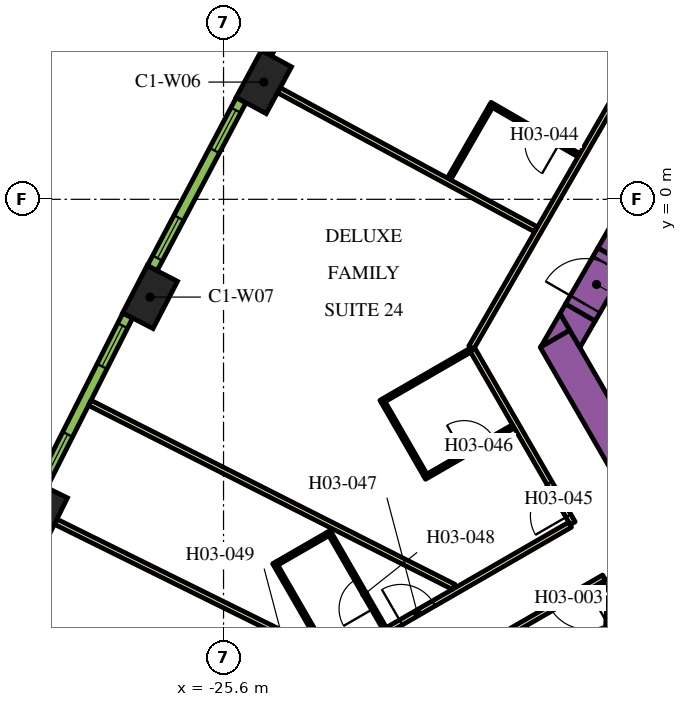
"""IFC4 building model, lengths in metres.
Left out: names, types, materials, properties, quantities, classifications, styles, units other than length and angle.
Written with IfcOpenShell. Run it as: python <this file> out.ifc"""

import sys

from ifc_helpers import new_model, si_unit, direction, frame, frame_2d, origin, origin_2d, place, context, subcontext, project, spatial, polyline, rectangle, outline, extrude, element, fill, save


model = new_model("IFC4")
c1 = context("Model", 3, precision=1e-05, world=origin(), true_north=direction((0.0, 1.0)))
c2 = subcontext(c1, "Body", "Model", "MODEL_VIEW")
j1 = project(units=[si_unit("LENGTHUNIT", "METRE"), si_unit("PLANEANGLEUNIT", "RADIAN")], contexts=[c1])
p1 = place(None, origin())
s1 = spatial("IfcSite", under=j1, at=p1, CompositionType="ELEMENT")
p2 = place(p1, origin())
s2 = spatial("IfcBuilding", under=s1, at=p2, CompositionType="ELEMENT")
p3 = place(p2, frame((0.0, 0.0, 51.0)))
s3 = spatial("IfcBuildingStorey", under=s2, at=p3, CompositionType="ELEMENT", Elevation=51.0)
for number, where, z_axis, x_axis in (
    (1, (-24.54, 3.085, 0.0), (0.0, 0.0, 1.0), (-0.476, -0.88, 0.0)),
    (2, (-27.533, -2.572, 0.0), (0.0, 0.0, 1.0), (-0.459, -0.888, 0.0)),
    (3, (-30.421, -8.284, 0.0), (0.0, 0.0, 1.0), (-0.443, -0.897, 0.0)),
):
    element("IfcColumn", number, at=place(p3, frame(where, z_axis=z_axis, x_axis=x_axis)), inside=s3, PredefinedType="COLUMN", context=c2, shape_type="SweptSolid", body=[
        extrude(rectangle(XDim=1.4, YDim=0.9, at=origin_2d()), origin(), (0.0, 0.0, 1.0), 3.9),
    ])
p4 = place(p3, frame((-15.36, -1.503, 0.0), z_axis=(0.0, 0.0, 1.0), x_axis=(0.50000389221, 0.866023156604, 0.0)))
e4 = element("IfcWall", 4, at=p4, inside=s3, PredefinedType="SOLIDWALL", context=c2, shape_type="SweptSolid", body=[
    extrude(rectangle(XDim=21.0, YDim=0.9, at=frame_2d((10.5, 0.0))), origin(), (0.0, 0.0, 1.0), 3.9),
])
p5 = place(p3, frame((-12.134, -11.883, 0.0), z_axis=(0.0, 0.0, 1.0), x_axis=(-0.500005339912, 0.866022320763, 0.0)))
e5 = element("IfcWall", 5, at=p5, inside=s3, PredefinedType="SOLIDWALL", context=c2, shape_type="SweptSolid", body=[
    extrude(rectangle(XDim=9.488, YDim=0.9, at=frame_2d((4.744, 0.0))), origin(), (0.0, 0.0, 1.0), 3.9),
])
p6 = place(p3, origin())
e6 = element("IfcWall", 6, at=p6, inside=s3, PredefinedType="SOLIDWALL", context=c2, shape_type="SweptSolid", body=[
    extrude(outline(polyline([(-16.489, -3.44), (-17.251, -3.88), (-16.743, -3.0), (-16.489, -3.44)])), origin(), (0.0, 0.0, 1.0), 3.9),
])
e7 = element("IfcWall", 7, at=p6, inside=s3, PredefinedType="SOLIDWALL", context=c2, shape_type="SweptSolid", body=[
    extrude(outline(polyline([(-15.82, -3.201), (-16.223, -3.9), (-16.743, -3.0), (-16.599, -2.751), (-15.82, -3.201)])), origin(), (0.0, 0.0, 1.0), 3.9),
])
p7 = place(p3, frame((-16.209, -2.976, 0.0), z_axis=(0.0, 0.0, 1.0), x_axis=(0.499954529098, 0.86605165483, 0.0)))
e8 = element("IfcWall", 8, at=p7, inside=s3, PredefinedType="SOLIDWALL", context=c2, shape_type="SweptSolid", body=[
    extrude(rectangle(XDim=1.7, YDim=0.9, at=frame_2d((0.85, 0.0))), origin(), (0.0, 0.0, 1.0), 3.9),
])
p8 = place(p7, frame((0.25, 0.0, 0.0)))
e9 = element("IfcOpeningElement", 9, at=p8, cuts=e8, PredefinedType="OPENING", context=c2, shape_type="SweptSolid", body=[
    extrude(rectangle(XDim=1.2, YDim=2.1, at=frame_2d((0.6, 1.05))), frame((0.0, 0.46, 0.0), z_axis=(0.0, -1.0, 0.0), x_axis=(1.0, 0.0, 0.0)), (0.0, 0.0, 1.0), 0.92),
])
p9 = place(p3, frame((-19.081, -3.9, 0.0), z_axis=(0.0, 0.0, 1.0), x_axis=(0.499998313975, 0.866026377209, 0.0)))
e10 = element("IfcWall", 10, at=p9, inside=s3, PredefinedType="PARTITIONING", context=c2, shape_type="SweptSolid", body=[
    extrude(rectangle(XDim=25.766, YDim=0.15, at=frame_2d((12.883, 0.0))), origin(), (0.0, 0.0, 1.0), 2.75),
])
p10 = place(p9, frame((22.445, 0.0, 0.0)))
e11 = element("IfcOpeningElement", 11, at=p10, cuts=e10, PredefinedType="OPENING", context=c2, shape_type="SweptSolid", body=[
    extrude(rectangle(XDim=1.0, YDim=2.1, at=frame_2d((0.5, 1.05))), frame((0.0, 0.085, 0.0), z_axis=(0.0, -1.0, 0.0), x_axis=(1.0, 0.0, 0.0)), (0.0, 0.0, 1.0), 0.17),
])
p11 = place(p9, frame((21.138, 0.0, 0.0)))
e12 = element("IfcOpeningElement", 12, at=p11, cuts=e10, PredefinedType="OPENING", context=c2, shape_type="SweptSolid", body=[
    extrude(rectangle(XDim=1.0, YDim=2.1, at=frame_2d((0.5, 1.05))), frame((0.0, 0.085, 0.0), z_axis=(0.0, -1.0, 0.0), x_axis=(1.0, 0.0, 0.0)), (0.0, 0.0, 1.0), 0.17),
])
p12 = place(p9, frame((14.066, 0.0, 0.0)))
e13 = element("IfcOpeningElement", 13, at=p12, cuts=e10, PredefinedType="OPENING", context=c2, shape_type="SweptSolid", body=[
    extrude(rectangle(XDim=0.9, YDim=2.1, at=frame_2d((0.45, 1.05))), frame((0.0, 0.085, 0.0), z_axis=(0.0, -1.0, 0.0), x_axis=(1.0, 0.0, 0.0)), (0.0, 0.0, 1.0), 0.17),
])
p13 = place(p9, frame((11.693, 0.0, 0.0)))
e14 = element("IfcOpeningElement", 14, at=p13, cuts=e10, PredefinedType="OPENING", context=c2, shape_type="SweptSolid", body=[
    extrude(rectangle(XDim=1.0, YDim=2.1, at=frame_2d((0.5, 1.05))), frame((0.0, 0.085, 0.0), z_axis=(0.0, -1.0, 0.0), x_axis=(1.0, 0.0, 0.0)), (0.0, 0.0, 1.0), 0.17),
])
p14 = place(p3, frame((-16.412, -8.523, 0.0), z_axis=(0.0, 0.0, 1.0), x_axis=(-0.500001929737, 0.866024289647, 0.0)))
e15 = element("IfcWall", 15, at=p14, inside=s3, PredefinedType="PARTITIONING", context=c2, shape_type="SweptSolid", body=[
    extrude(rectangle(XDim=5.268, YDim=0.15, at=frame_2d((2.634, 0.0))), origin(), (0.0, 0.0, 1.0), 2.75),
])
p15 = place(p14, frame((0.226, 0.0, 0.0)))
e16 = element("IfcOpeningElement", 16, at=p15, cuts=e15, PredefinedType="OPENING", context=c2, shape_type="SweptSolid", body=[
    extrude(rectangle(XDim=1.0, YDim=2.1, at=frame_2d((0.5, 1.05))), frame((0.0, 0.085, 0.0), z_axis=(0.0, -1.0, 0.0), x_axis=(1.0, 0.0, 0.0)), (0.0, 0.0, 1.0), 0.17),
])
p16 = place(p3, frame((-30.463, -16.635, 0.0), z_axis=(0.0, 0.0, 1.0), x_axis=(0.866022394896, 0.500005211512, 0.0)))
e17 = element("IfcWall", 17, at=p16, inside=s3, PredefinedType="PARTITIONING", context=c2, shape_type="SweptSolid", body=[
    extrude(rectangle(XDim=16.144, YDim=0.15, at=frame_2d((8.072, 0.0))), origin(), (0.0, 0.0, 1.0), 2.75),
])
p17 = place(p16, frame((11.004, 0.0, 0.0)))
e18 = element("IfcOpeningElement", 18, at=p17, cuts=e17, PredefinedType="OPENING", context=c2, shape_type="SweptSolid", body=[
    extrude(rectangle(XDim=1.0, YDim=2.1, at=frame_2d((0.5, 1.05))), frame((0.0, 0.085, 0.0), z_axis=(0.0, -1.0, 0.0), x_axis=(1.0, 0.0, 0.0)), (0.0, 0.0, 1.0), 0.17),
])
p18 = place(p16, frame((7.274, 0.0, 0.0)))
e19 = element("IfcOpeningElement", 19, at=p18, cuts=e17, PredefinedType="OPENING", context=c2, shape_type="SweptSolid", body=[
    extrude(rectangle(XDim=1.0, YDim=2.1, at=frame_2d((0.5, 1.05))), frame((0.0, 0.085, 0.0), z_axis=(0.0, -1.0, 0.0), x_axis=(1.0, 0.0, 0.0)), (0.0, 0.0, 1.0), 0.17),
])
p19 = place(p3, frame((-15.587, -9.952, 0.0), z_axis=(0.0, 0.0, 1.0), x_axis=(-0.866022197818, -0.500005552856, 0.0)))
e20 = element("IfcWall", 20, at=p19, inside=s3, PredefinedType="PARTITIONING", context=c2, shape_type="SweptSolid", body=[
    extrude(rectangle(XDim=16.224, YDim=0.15, at=frame_2d((8.112, 0.0))), origin(), (0.0, 0.0, 1.0), 2.75),
])
p20 = place(p19, frame((7.949, 0.0, 0.0)))
e21 = element("IfcOpeningElement", 21, at=p20, cuts=e20, PredefinedType="OPENING", context=c2, shape_type="SweptSolid", body=[
    extrude(rectangle(XDim=1.0, YDim=2.1, at=frame_2d((0.5, 1.05))), frame((0.0, 0.085, 0.0), z_axis=(0.0, -1.0, 0.0), x_axis=(1.0, 0.0, 0.0)), (0.0, 0.0, 1.0), 0.17),
])
p21 = place(p19, frame((0.525, 0.0, 0.0)))
e22 = element("IfcOpeningElement", 22, at=p21, cuts=e20, PredefinedType="OPENING", context=c2, shape_type="SweptSolid", body=[
    extrude(rectangle(XDim=1.1, YDim=2.1, at=frame_2d((0.55, 1.05))), frame((0.0, 0.085, 0.0), z_axis=(0.0, -1.0, 0.0), x_axis=(1.0, 0.0, 0.0)), (0.0, 0.0, 1.0), 0.17),
])
p22 = place(p3, frame((-12.918, -14.575, 0.0), z_axis=(0.0, 0.0, 1.0), x_axis=(-0.500009150678, 0.866020120573, 0.0)))
e23 = element("IfcWall", 23, at=p22, inside=s3, PredefinedType="PARTITIONING", context=c2, shape_type="SweptSolid", body=[
    extrude(rectangle(XDim=5.258, YDim=0.15, at=frame_2d((2.629, 0.0))), origin(), (0.0, 0.0, 1.0), 2.75),
])
p23 = place(p3, frame((-30.018, -8.483, 0.0), z_axis=(0.0, 0.0, 1.0), x_axis=(0.896544505264, -0.44295366584, 0.0)))
e24 = element("IfcWall", 24, at=p23, inside=s3, PredefinedType="PARTITIONING", context=c2, shape_type="SweptSolid", body=[
    extrude(rectangle(XDim=8.079, YDim=0.15, at=frame_2d((4.04, 0.0))), origin(), (0.0, 0.0, 1.0), 2.75),
])
p24 = place(p3, frame((-29.12, -5.356, 0.0), z_axis=(0.0, 0.0, 1.0), x_axis=(0.892401965553, -0.451241323327, 0.0)))
e25 = element("IfcWall", 25, at=p24, inside=s3, PredefinedType="PARTITIONING", context=c2, shape_type="SweptSolid", body=[
    extrude(rectangle(XDim=10.729, YDim=0.15, at=frame_2d((5.364, 0.0))), origin(), (0.0, 0.0, 1.0), 2.75),
])
p25 = place(p3, frame((-24.145, 2.871, 0.0), z_axis=(0.0, 0.0, 1.0), x_axis=(0.879551725039, -0.475803281809, 0.0)))
e26 = element("IfcWall", 26, at=p25, inside=s3, PredefinedType="PARTITIONING", context=c2, shape_type="SweptSolid", body=[
    extrude(rectangle(XDim=7.688, YDim=0.15, at=frame_2d((3.844, 0.0))), origin(), (0.0, 0.0, 1.0), 2.75),
])
p26 = place(p3, frame((-15.973, -22.109, 0.0), z_axis=(0.0, 0.0, 1.0), x_axis=(0.046191717129, 0.998932592955, 0.0)))
e27 = element("IfcWall", 27, at=p26, inside=s3, PredefinedType="PARTITIONING", context=c2, shape_type="SweptSolid", body=[
    extrude(rectangle(XDim=11.638, YDim=0.15, at=frame_2d((5.819, 0.0))), origin(), (0.0, 0.0, 1.0), 2.75),
])
p27 = place(p3, frame((-16.247, 1.159, 0.0), z_axis=(0.0, 0.0, 1.0), x_axis=(-0.866059108428, 0.4999416173, 0.0)))
e28 = element("IfcWall", 28, at=p27, inside=s3, PredefinedType="PARTITIONING", context=c2, shape_type="SweptSolid", body=[
    extrude(rectangle(XDim=2.7, YDim=0.1, at=frame_2d((1.35, 0.0))), origin(), (0.0, 0.0, 1.0), 2.75),
])
p28 = place(p27, frame((0.6, 0.0, 0.0)))
e29 = element("IfcOpeningElement", 29, at=p28, cuts=e28, PredefinedType="OPENING", context=c2, shape_type="SweptSolid", body=[
    extrude(rectangle(XDim=0.9, YDim=2.1, at=frame_2d((0.45, 1.05))), frame((0.0, 0.06, 0.0), z_axis=(0.0, -1.0, 0.0), x_axis=(1.0, 0.0, 0.0)), (0.0, 0.0, 1.0), 0.12),
])
p29 = place(p3, frame((-18.567, 2.441, 0.0), z_axis=(0.0, 0.0, 1.0), x_axis=(-0.499946605688, -0.86605622881, 0.0)))
e30 = element("IfcWall", 30, at=p29, inside=s3, PredefinedType="PARTITIONING", context=c2, shape_type="SweptSolid", body=[
    extrude(rectangle(XDim=2.2, YDim=0.1, at=frame_2d((1.1, 0.0))), origin(), (0.0, 0.0, 1.0), 2.75),
])
p30 = place(p3, frame((-20.31, -7.323, 0.0), z_axis=(0.0, 0.0, 1.0), x_axis=(0.86599734893, 0.500048589285, 0.0)))
e31 = element("IfcWall", 31, at=p30, inside=s3, PredefinedType="PARTITIONING", context=c2, shape_type="SweptSolid", body=[
    extrude(rectangle(XDim=2.7, YDim=0.1, at=frame_2d((1.35, 0.0))), origin(), (0.0, 0.0, 1.0), 2.75),
])
p31 = place(p30, frame((1.2, 0.0, 0.0)))
e32 = element("IfcOpeningElement", 32, at=p31, cuts=e31, PredefinedType="OPENING", context=c2, shape_type="SweptSolid", body=[
    extrude(rectangle(XDim=0.9, YDim=2.1, at=frame_2d((0.45, 1.05))), frame((0.0, 0.06, 0.0), z_axis=(0.0, -1.0, 0.0), x_axis=(1.0, 0.0, 0.0)), (0.0, 0.0, 1.0), 0.12),
])
p32 = place(p3, frame((-20.291, -7.254, 0.0), z_axis=(0.0, 0.0, 1.0), x_axis=(-0.50002983664, 0.866008176907, 0.0)))
e33 = element("IfcWall", 33, at=p32, inside=s3, PredefinedType="PARTITIONING", context=c2, shape_type="SweptSolid", body=[
    extrude(rectangle(XDim=2.2, YDim=0.1, at=frame_2d((1.1, 0.0))), origin(), (0.0, 0.0, 1.0), 2.75),
])
p33 = place(p3, frame((-19.121, -3.981, 0.0), z_axis=(0.0, 0.0, 1.0), x_axis=(-0.866019956843, -0.50000943426, 0.0)))
e34 = element("IfcWall", 34, at=p33, inside=s3, PredefinedType="PARTITIONING", context=c2, shape_type="SweptSolid", body=[
    extrude(rectangle(XDim=2.7, YDim=0.1, at=frame_2d((1.35, 0.0))), origin(), (0.0, 0.0, 1.0), 2.75),
])
p34 = place(p3, frame((-21.36, -11.293, 0.0), z_axis=(0.0, 0.0, 1.0), x_axis=(-0.49997559174, 0.866039495442, 0.0)))
e35 = element("IfcWall", 35, at=p34, inside=s3, PredefinedType="PARTITIONING", context=c2, shape_type="SweptSolid", body=[
    extrude(rectangle(XDim=2.95, YDim=0.1, at=frame_2d((1.475, 0.0))), origin(), (0.0, 0.0, 1.0), 2.75),
])
p35 = place(p34, frame((0.6, 0.0, 0.0)))
e36 = element("IfcOpeningElement", 36, at=p35, cuts=e35, PredefinedType="OPENING", context=c2, shape_type="SweptSolid", body=[
    extrude(rectangle(XDim=0.9, YDim=2.1, at=frame_2d((0.45, 1.05))), frame((0.0, 0.06, 0.0), z_axis=(0.0, -1.0, 0.0), x_axis=(1.0, 0.0, 0.0)), (0.0, 0.0, 1.0), 0.12),
])
p36 = place(p3, frame((-22.853, -8.806, 0.0), z_axis=(0.0, 0.0, 1.0), x_axis=(-0.86601511528, -0.500017819788, 0.0)))
e37 = element("IfcWall", 37, at=p36, inside=s3, PredefinedType="PARTITIONING", context=c2, shape_type="SweptSolid", body=[
    extrude(rectangle(XDim=1.55, YDim=0.1, at=frame_2d((0.775, 0.0))), origin(), (0.0, 0.0, 1.0), 2.75),
])
p37 = place(p3, frame((-22.944, -11.85, 0.0), z_axis=(0.0, 0.0, 1.0), x_axis=(-0.499938597367, 0.866060851709, 0.0)))
e38 = element("IfcWall", 38, at=p37, inside=s3, PredefinedType="PARTITIONING", context=c2, shape_type="SweptSolid", body=[
    extrude(rectangle(XDim=2.64, YDim=0.1, at=frame_2d((1.32, 0.0))), origin(), (0.0, 0.0, 1.0), 2.75),
])
p38 = place(p3, frame((-22.05, 8.22, 0.0), z_axis=(0.0, 0.0, 1.0), x_axis=(-0.483912572871, -0.875116347589, 0.0)))
e39 = element("IfcWall", 39, at=p38, inside=s3, PredefinedType="SOLIDWALL", context=c2, shape_type="SweptSolid", body=[
    extrude(rectangle(XDim=4.998, YDim=0.29, at=frame_2d((2.499, 0.0))), origin(), (0.0, 0.0, 1.0), 3.65),
])
p39 = place(p38, frame((0.297, 0.0, 0.9)))
e40 = element("IfcOpeningElement", 40, at=p39, cuts=e39, PredefinedType="OPENING", context=c2, shape_type="SweptSolid", body=[
    extrude(rectangle(XDim=1.2, YDim=2.15, at=frame_2d((0.6, 1.075))), frame((0.0, 0.155, 0.0), z_axis=(0.0, -1.0, 0.0), x_axis=(1.0, 0.0, 0.0)), (0.0, 0.0, 1.0), 0.31),
])
p40 = place(p38, frame((3.501, 0.0, 0.9)))
e41 = element("IfcOpeningElement", 41, at=p40, cuts=e39, PredefinedType="OPENING", context=c2, shape_type="SweptSolid", body=[
    extrude(rectangle(XDim=1.2, YDim=2.15, at=frame_2d((0.6, 1.075))), frame((0.0, 0.155, 0.0), z_axis=(0.0, -1.0, 0.0), x_axis=(1.0, 0.0, 0.0)), (0.0, 0.0, 1.0), 0.31),
])
p41 = place(p3, frame((-25.138, 2.608, 0.0), z_axis=(0.0, 0.0, 1.0), x_axis=(-0.467629620899, -0.883924509026, 0.0)))
e42 = element("IfcWall", 42, at=p41, inside=s3, PredefinedType="SOLIDWALL", context=c2, shape_type="SweptSolid", body=[
    extrude(rectangle(XDim=4.998, YDim=0.29, at=frame_2d((2.499, 0.0))), origin(), (0.0, 0.0, 1.0), 3.65),
])
p42 = place(p41, frame((0.297, 0.0, 0.9)))
e43 = element("IfcOpeningElement", 43, at=p42, cuts=e42, PredefinedType="OPENING", context=c2, shape_type="SweptSolid", body=[
    extrude(rectangle(XDim=1.2, YDim=2.15, at=frame_2d((0.6, 1.075))), frame((0.0, 0.155, 0.0), z_axis=(0.0, -1.0, 0.0), x_axis=(1.0, 0.0, 0.0)), (0.0, 0.0, 1.0), 0.31),
])
p43 = place(p41, frame((3.501, 0.0, 0.9)))
e44 = element("IfcOpeningElement", 44, at=p43, cuts=e42, PredefinedType="OPENING", context=c2, shape_type="SweptSolid", body=[
    extrude(rectangle(XDim=1.2, YDim=2.15, at=frame_2d((0.6, 1.075))), frame((0.0, 0.155, 0.0), z_axis=(0.0, -1.0, 0.0), x_axis=(1.0, 0.0, 0.0)), (0.0, 0.0, 1.0), 0.31),
])
p44 = place(p3, frame((-28.122, -3.06, 0.0), z_axis=(0.0, 0.0, 1.0), x_axis=(-0.451233929645, -0.892405704115, 0.0)))
e45 = element("IfcWall", 45, at=p44, inside=s3, PredefinedType="SOLIDWALL", context=c2, shape_type="SweptSolid", body=[
    extrude(rectangle(XDim=4.998, YDim=0.29, at=frame_2d((2.499, 0.0))), origin(), (0.0, 0.0, 1.0), 3.65),
])
p45 = place(p44, frame((0.297, 0.0, 0.9)))
e46 = element("IfcOpeningElement", 46, at=p45, cuts=e45, PredefinedType="OPENING", context=c2, shape_type="SweptSolid", body=[
    extrude(rectangle(XDim=1.2, YDim=2.15, at=frame_2d((0.6, 1.075))), frame((0.0, 0.155, 0.0), z_axis=(0.0, -1.0, 0.0), x_axis=(1.0, 0.0, 0.0)), (0.0, 0.0, 1.0), 0.31),
])
p46 = place(p44, frame((3.501, 0.0, 0.9)))
e47 = element("IfcOpeningElement", 47, at=p46, cuts=e45, PredefinedType="OPENING", context=c2, shape_type="SweptSolid", body=[
    extrude(rectangle(XDim=1.2, YDim=2.15, at=frame_2d((0.6, 1.075))), frame((0.0, 0.155, 0.0), z_axis=(0.0, -1.0, 0.0), x_axis=(1.0, 0.0, 0.0)), (0.0, 0.0, 1.0), 0.31),
])
p47 = place(p8, origin())
e48 = element("IfcDoor", 48, at=p47, inside=s3, OperationType="SINGLE_SWING_LEFT", PredefinedType="DOOR", context=c2, shape_type="SweptSolid", body=[
    extrude(rectangle(XDim=1.2, YDim=2.1, at=frame_2d((0.6, 1.05))), frame((0.0, 0.025, 0.0), z_axis=(0.0, -1.0, 0.0), x_axis=(1.0, 0.0, 0.0)), (0.0, 0.0, 1.0), 0.05),
])
fill(e9, e48)
p48 = place(p21, origin())
e49 = element("IfcDoor", 49, at=p48, inside=s3, OperationType="SINGLE_SWING_LEFT", PredefinedType="DOOR", context=c2, shape_type="SweptSolid", body=[
    extrude(rectangle(XDim=1.1, YDim=2.1, at=frame_2d((0.55, 1.05))), frame((0.0, 0.025, 0.0), z_axis=(0.0, -1.0, 0.0), x_axis=(1.0, 0.0, 0.0)), (0.0, 0.0, 1.0), 0.05),
])
fill(e22, e49)
p49 = place(p28, origin())
e50 = element("IfcDoor", 50, at=p49, inside=s3, OperationType="SINGLE_SWING_LEFT", PredefinedType="DOOR", context=c2, shape_type="SweptSolid", body=[
    extrude(rectangle(XDim=0.9, YDim=2.1, at=frame_2d((0.45, 1.05))), frame((0.0, 0.025, 0.0), z_axis=(0.0, -1.0, 0.0), x_axis=(1.0, 0.0, 0.0)), (0.0, 0.0, 1.0), 0.05),
])
fill(e29, e50)
p50 = place(p15, origin())
e51 = element("IfcDoor", 51, at=p50, inside=s3, OperationType="SINGLE_SWING_LEFT", PredefinedType="DOOR", context=c2, shape_type="SweptSolid", body=[
    extrude(rectangle(XDim=1.0, YDim=2.1, at=frame_2d((0.5, 1.05))), frame((0.0, 0.025, 0.0), z_axis=(0.0, -1.0, 0.0), x_axis=(1.0, 0.0, 0.0)), (0.0, 0.0, 1.0), 0.05),
])
fill(e16, e51)
p51 = place(p31, origin())
e52 = element("IfcDoor", 52, at=p51, inside=s3, OperationType="SINGLE_SWING_RIGHT", PredefinedType="DOOR", context=c2, shape_type="SweptSolid", body=[
    extrude(rectangle(XDim=0.9, YDim=2.1, at=frame_2d((0.45, 1.05))), frame((0.0, 0.025, 0.0), z_axis=(0.0, -1.0, 0.0), x_axis=(1.0, 0.0, 0.0)), (0.0, 0.0, 1.0), 0.05),
])
fill(e32, e52)
p52 = place(p17, origin())
e53 = element("IfcDoor", 53, at=p52, inside=s3, OperationType="SINGLE_SWING_RIGHT", PredefinedType="DOOR", context=c2, shape_type="SweptSolid", body=[
    extrude(rectangle(XDim=1.0, YDim=2.1, at=frame_2d((0.5, 1.05))), frame((0.0, 0.025, 0.0), z_axis=(0.0, -1.0, 0.0), x_axis=(1.0, 0.0, 0.0)), (0.0, 0.0, 1.0), 0.05),
])
fill(e18, e53)
p53 = place(p35, origin())
e54 = element("IfcDoor", 54, at=p53, inside=s3, OperationType="SINGLE_SWING_LEFT", PredefinedType="DOOR", context=c2, shape_type="SweptSolid", body=[
    extrude(rectangle(XDim=0.9, YDim=2.1, at=frame_2d((0.45, 1.05))), frame((0.0, 0.025, 0.0), z_axis=(0.0, -1.0, 0.0), x_axis=(1.0, 0.0, 0.0)), (0.0, 0.0, 1.0), 0.05),
])
fill(e36, e54)
p54 = place(p42, origin())
e55 = element("IfcWindow", 55, at=p54, inside=s3, PartitioningType="DOUBLE_PANEL_VERTICAL", PredefinedType="WINDOW", context=c2, shape_type="SweptSolid", body=[
    extrude(rectangle(XDim=1.2, YDim=2.15, at=frame_2d((0.6, 1.075))), frame((0.0, 0.015, 0.0), z_axis=(0.0, -1.0, 0.0), x_axis=(1.0, 0.0, 0.0)), (0.0, 0.0, 1.0), 0.06),
])
fill(e43, e55)
p55 = place(p43, origin())
e56 = element("IfcWindow", 56, at=p55, inside=s3, PartitioningType="DOUBLE_PANEL_VERTICAL", PredefinedType="WINDOW", context=c2, shape_type="SweptSolid", body=[
    extrude(rectangle(XDim=1.2, YDim=2.15, at=frame_2d((0.6, 1.075))), frame((0.0, 0.015, 0.0), z_axis=(0.0, -1.0, 0.0), x_axis=(1.0, 0.0, 0.0)), (0.0, 0.0, 1.0), 0.06),
])
fill(e44, e56)
p56 = place(p45, origin())
e57 = element("IfcWindow", 57, at=p56, inside=s3, PartitioningType="DOUBLE_PANEL_VERTICAL", PredefinedType="WINDOW", context=c2, shape_type="SweptSolid", body=[
    extrude(rectangle(XDim=1.2, YDim=2.15, at=frame_2d((0.6, 1.075))), frame((0.0, 0.015, 0.0), z_axis=(0.0, -1.0, 0.0), x_axis=(1.0, 0.0, 0.0)), (0.0, 0.0, 1.0), 0.06),
])
fill(e46, e57)
p57 = place(p46, origin())
e58 = element("IfcWindow", 58, at=p57, inside=s3, PartitioningType="DOUBLE_PANEL_VERTICAL", PredefinedType="WINDOW", context=c2, shape_type="SweptSolid", body=[
    extrude(rectangle(XDim=1.2, YDim=2.15, at=frame_2d((0.6, 1.075))), frame((0.0, 0.015, 0.0), z_axis=(0.0, -1.0, 0.0), x_axis=(1.0, 0.0, 0.0)), (0.0, 0.0, 1.0), 0.06),
])
fill(e47, e58)
save(model, sys.argv[1])
